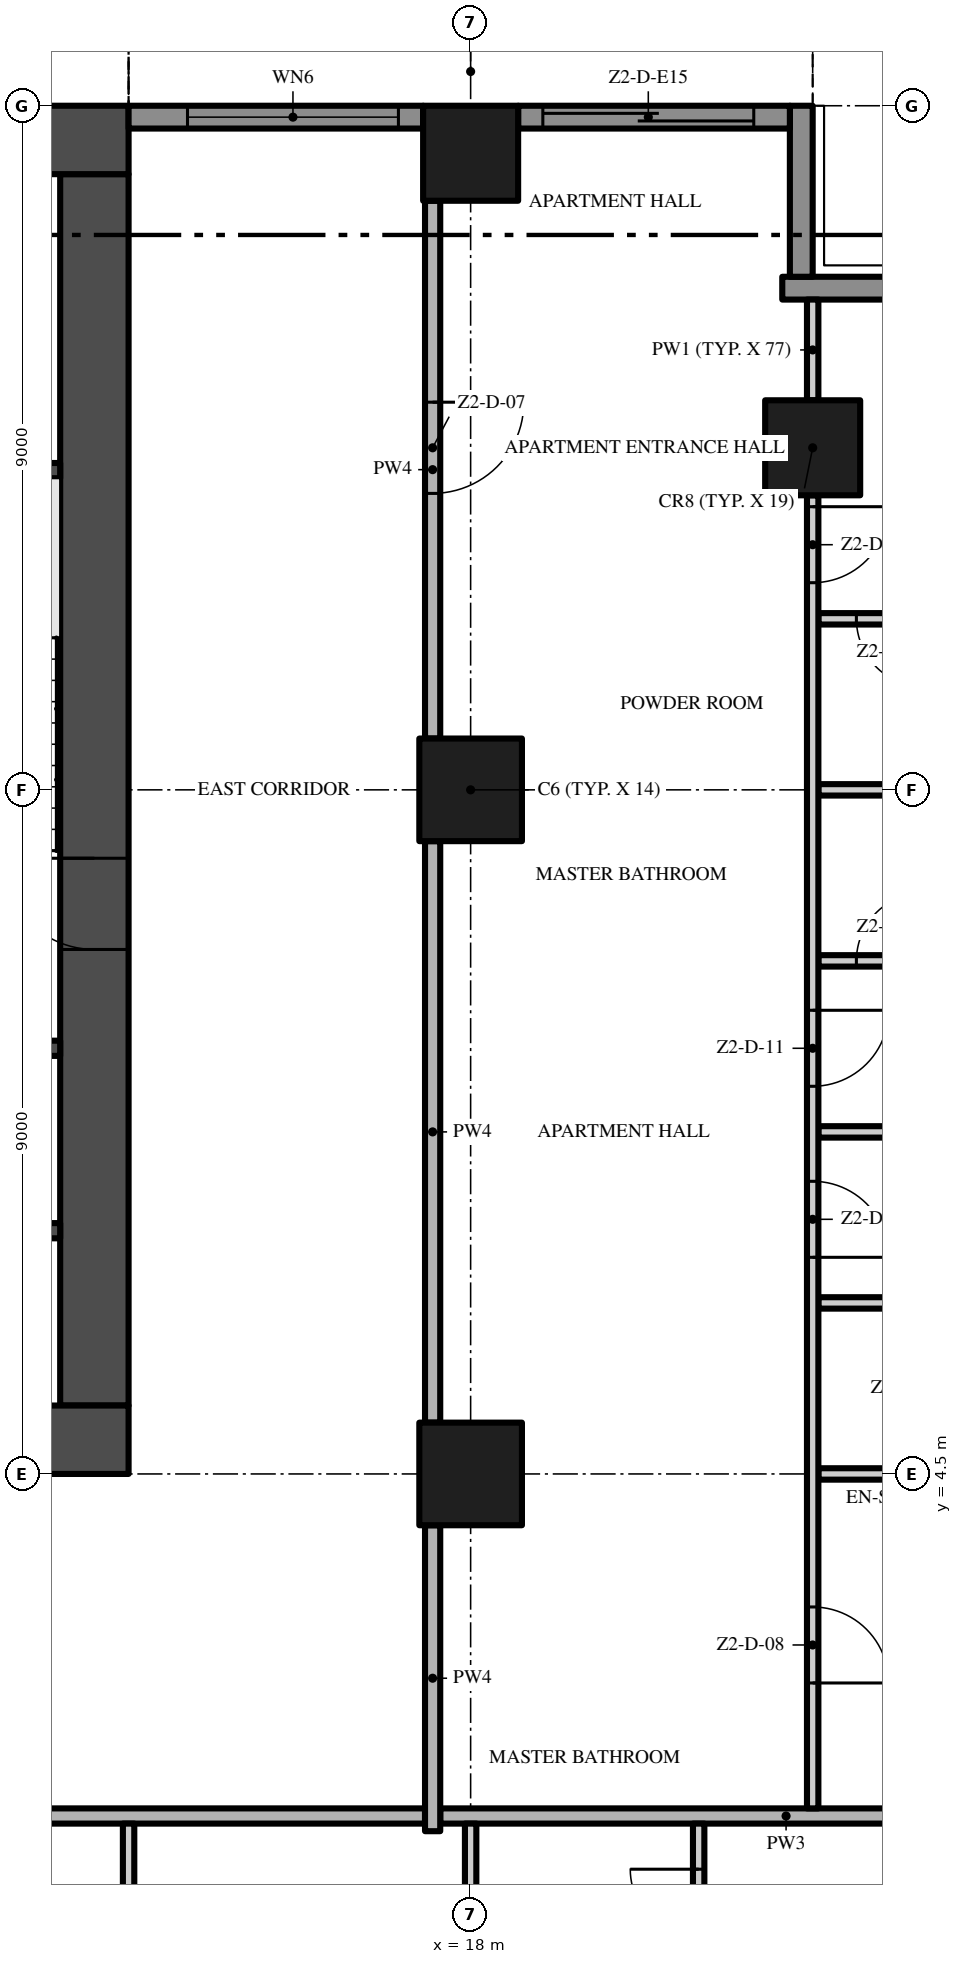
"""IFC4 building model, lengths in metres.
Left out: names, types, materials, properties, quantities, classifications, styles, units other than length and angle.
Written with IfcOpenShell. Run it as: python <this file> out.ifc"""

import sys

from ifc_helpers import new_model, si_unit, direction, frame, frame_2d, origin, origin_2d, place, context, subcontext, project, spatial, rectangle, extrude, element, fill, save


model = new_model("IFC4")
c1 = context("Model", 3, precision=1e-05, world=origin(), true_north=direction((0.0, 1.0)))
c2 = subcontext(c1, "Body", "Model", "MODEL_VIEW")
j1 = project(units=[si_unit("LENGTHUNIT", "METRE"), si_unit("PLANEANGLEUNIT", "RADIAN")], contexts=[c1])
p1 = place(None, origin())
s1 = spatial("IfcSite", under=j1, at=p1, CompositionType="ELEMENT")
p2 = place(p1, origin())
s2 = spatial("IfcBuilding", under=s1, at=p2, CompositionType="ELEMENT")
p3 = place(p2, frame((0.0, 0.0, 107.4)))
s3 = spatial("IfcBuildingStorey", under=s2, at=p3, CompositionType="ELEMENT", Elevation=107.4)
p4 = place(p3, frame((-13.5, 4.95, -0.3), z_axis=(0.0, 0.0, 1.0), x_axis=(1.0, 0.0, 0.0)))
e1 = element("IfcWall", 1, at=p4, inside=s3, PredefinedType="SHEAR", context=c2, shape_type="SweptSolid", body=[
    extrude(rectangle(XDim=27.0, YDim=0.9, at=frame_2d((13.5, 0.0))), origin(), (0.0, 0.0, 1.0), 3.8),
])
p5 = place(p4, frame((12.0, 0.0, 0.3)))
e2 = element("IfcOpeningElement", 2, at=p5, cuts=e1, PredefinedType="OPENING", context=c2, shape_type="SweptSolid", body=[
    extrude(rectangle(XDim=3.0, YDim=2.4, at=frame_2d((1.5, 1.2))), frame((0.0, 0.46, 0.0), z_axis=(0.0, -1.0, 0.0), x_axis=(1.0, 0.0, 0.0)), (0.0, 0.0, 1.0), 0.92),
])
p6 = place(p4, frame((4.9, 0.0, 0.3)))
e3 = element("IfcOpeningElement", 3, at=p6, cuts=e1, PredefinedType="OPENING", context=c2, shape_type="SweptSolid", body=[
    extrude(rectangle(XDim=1.2, YDim=2.2, at=frame_2d((0.6, 1.1))), frame((0.0, 0.46, 0.0), z_axis=(0.0, -1.0, 0.0), x_axis=(1.0, 0.0, 0.0)), (0.0, 0.0, 1.0), 0.92),
])
p7 = place(p4, frame((20.75, 0.0, 0.3)))
e4 = element("IfcOpeningElement", 4, at=p7, cuts=e1, PredefinedType="OPENING", context=c2, shape_type="SweptSolid", body=[
    extrude(rectangle(XDim=1.5, YDim=2.2, at=frame_2d((0.75, 1.1))), frame((0.0, 0.46, 0.0), z_axis=(0.0, -1.0, 0.0), x_axis=(1.0, 0.0, 0.0)), (0.0, 0.0, 1.0), 0.92),
])
p8 = place(p4, frame((17.4, 0.0, 0.3)))
e5 = element("IfcOpeningElement", 5, at=p8, cuts=e1, PredefinedType="OPENING", context=c2, shape_type="SweptSolid", body=[
    extrude(rectangle(XDim=1.2, YDim=2.2, at=frame_2d((0.6, 1.1))), frame((0.0, 0.46, 0.0), z_axis=(0.0, -1.0, 0.0), x_axis=(1.0, 0.0, 0.0)), (0.0, 0.0, 1.0), 0.92),
])
p9 = place(p3, frame((13.05, 5.4, -0.3), z_axis=(0.0, 0.0, 1.0), x_axis=(0.0, 1.0, 0.0)))
e6 = element("IfcWall", 6, at=p9, inside=s3, PredefinedType="SHEAR", context=c2, shape_type="SweptSolid", body=[
    extrude(rectangle(XDim=16.2, YDim=0.9, at=frame_2d((8.1, 0.0))), origin(), (0.0, 0.0, 1.0), 3.8),
])
p10 = place(p9, frame((6.0, 0.0, 0.3)))
e7 = element("IfcOpeningElement", 7, at=p10, cuts=e6, PredefinedType="OPENING", context=c2, shape_type="SweptSolid", body=[
    extrude(rectangle(XDim=1.2, YDim=2.2, at=frame_2d((0.6, 1.1))), frame((0.0, 0.46, 0.0), z_axis=(0.0, -1.0, 0.0), x_axis=(1.0, 0.0, 0.0)), (0.0, 0.0, 1.0), 0.92),
])
p11 = place(p3, frame((13.5, 22.05, -0.3), z_axis=(0.0, 0.0, 1.0), x_axis=(-1.0, 0.0, 0.0)))
e8 = element("IfcWall", 8, at=p11, inside=s3, PredefinedType="SHEAR", context=c2, shape_type="SweptSolid", body=[
    extrude(rectangle(XDim=27.0, YDim=0.9, at=frame_2d((13.5, 0.0))), origin(), (0.0, 0.0, 1.0), 3.8),
])
p12 = place(p3, frame((18.0, 13.5, 0.0), z_axis=(0.0, 0.0, 1.0), x_axis=(1.0, 0.0, 0.0)))
e9 = element("IfcColumn", 9, at=p12, inside=s3, PredefinedType="COLUMN", context=c2, shape_type="SweptSolid", body=[
    extrude(rectangle(XDim=1.35, YDim=1.35, at=origin_2d()), origin(), (0.0, 0.0, 1.0), 3.5),
])
p13 = place(p3, frame((18.0, 21.875, 0.0), z_axis=(0.0, 0.0, 1.0), x_axis=(1.0, 0.0, 0.0)))
e10 = element("IfcColumn", 10, at=p13, inside=s3, PredefinedType="COLUMN", context=c2, shape_type="SweptSolid", body=[
    extrude(rectangle(XDim=1.25, YDim=1.25, at=origin_2d()), origin(), (0.0, 0.0, 1.0), 3.5),
])
p14 = place(p3, frame((18.0, 4.5, 0.0), z_axis=(0.0, 0.0, 1.0), x_axis=(1.0, 0.0, 0.0)))
e11 = element("IfcColumn", 11, at=p14, inside=s3, PredefinedType="COLUMN", context=c2, shape_type="SweptSolid", body=[
    extrude(rectangle(XDim=1.35, YDim=1.35, at=origin_2d()), origin(), (0.0, 0.0, 1.0), 3.5),
])
p15 = place(p3, frame((22.5, 18.0, 0.0), z_axis=(0.0, 0.0, 1.0), x_axis=(1.0, 0.0, 0.0)))
e12 = element("IfcColumn", 12, at=p15, inside=s3, PredefinedType="COLUMN", context=c2, shape_type="SweptSolid", body=[
    extrude(rectangle(XDim=1.25, YDim=1.25, at=origin_2d()), origin(), (0.0, 0.0, 1.0), 3.5),
])
p16 = place(p3, frame((22.1, 20.1, 0.0), z_axis=(0.0, 0.0, 1.0), x_axis=(1.0, 0.0, 0.0)))
e13 = element("IfcWall", 13, at=p16, inside=s3, PredefinedType="SOLIDWALL", context=c2, shape_type="SweptSolid", body=[
    extrude(rectangle(XDim=2.35, YDim=0.3, at=frame_2d((1.175, 0.0))), origin(), (0.0, 0.0, 1.0), 3.5),
])
p17 = place(p3, frame((22.35, 22.5, 0.0), z_axis=(0.0, 0.0, 1.0), x_axis=(0.0, -1.0, 0.0)))
e14 = element("IfcWall", 14, at=p17, inside=s3, PredefinedType="SOLIDWALL", context=c2, shape_type="SweptSolid", body=[
    extrude(rectangle(XDim=2.25, YDim=0.3, at=frame_2d((1.125, 0.0))), origin(), (0.0, 0.0, 1.0), 3.5),
])
p18 = place(p3, frame((18.625, 22.35, 0.0), z_axis=(0.0, 0.0, 1.0), x_axis=(1.0, 0.0, 0.0)))
e15 = element("IfcWall", 15, at=p18, inside=s3, PredefinedType="SOLIDWALL", context=c2, shape_type="SweptSolid", body=[
    extrude(rectangle(XDim=3.575, YDim=0.3, at=frame_2d((1.788, 0.0))), origin(), (0.0, 0.0, 1.0), 3.5),
])
p19 = place(p18, frame((0.325, 0.0, 0.0)))
e16 = element("IfcOpeningElement", 16, at=p19, cuts=e15, PredefinedType="OPENING", context=c2, shape_type="SweptSolid", body=[
    extrude(rectangle(XDim=2.775, YDim=2.4, at=frame_2d((1.387, 1.2))), frame((0.0, 0.16, 0.0), z_axis=(0.0, -1.0, 0.0), x_axis=(1.0, 0.0, 0.0)), (0.0, 0.0, 1.0), 0.32),
])
p20 = place(p3, frame((13.5, 22.35, 0.0), z_axis=(0.0, 0.0, 1.0), x_axis=(1.0, 0.0, 0.0)))
e17 = element("IfcWall", 17, at=p20, inside=s3, PredefinedType="SOLIDWALL", context=c2, shape_type="SweptSolid", body=[
    extrude(rectangle(XDim=3.875, YDim=0.3, at=frame_2d((1.938, 0.0))), origin(), (0.0, 0.0, 1.0), 3.5),
])
p21 = place(p20, frame((0.775, 0.0, 0.45)))
e18 = element("IfcOpeningElement", 18, at=p21, cuts=e17, PredefinedType="OPENING", context=c2, shape_type="SweptSolid", body=[
    extrude(rectangle(XDim=2.775, YDim=2.65, at=frame_2d((1.387, 1.325))), frame((0.0, 0.16, 0.0), z_axis=(0.0, -1.0, 0.0), x_axis=(1.0, 0.0, 0.0)), (0.0, 0.0, 1.0), 0.32),
])
for number, where, z_axis, x_axis in (
    (19, (9.65, 7.7, 0.0), (0.0, 0.0, 1.0), (1.0, 0.0, 0.0)),
    (20, (9.65, 10.1, 0.0), (0.0, 0.0, 1.0), (1.0, 0.0, 0.0)),
    (21, (9.65, 17.7, 0.0), (0.0, 0.0, 1.0), (1.0, 0.0, 0.0)),
):
    element("IfcWall", number, at=place(p3, frame(where, z_axis=z_axis, x_axis=x_axis)), inside=s3, PredefinedType="SHEAR", context=c2, shape_type="SweptSolid", body=[
        extrude(rectangle(XDim=2.95, YDim=0.2, at=frame_2d((1.475, 0.0))), origin(), (0.0, 0.0, 1.0), 3.5),
    ])
p22 = place(p3, frame((4.6, 0.0, 0.0), z_axis=(0.0, 0.0, 1.0), x_axis=(1.0, 0.0, 0.0)))
e22 = element("IfcWall", 22, at=p22, inside=s3, PredefinedType="PARTITIONING", context=c2, shape_type="SweptSolid", body=[
    extrude(rectangle(XDim=12.8, YDim=0.2, at=frame_2d((6.4, 0.0))), origin(), (0.0, 0.0, 1.0), 3.5),
])
p23 = place(p3, frame((17.6, 0.0, 0.0), z_axis=(0.0, 0.0, 1.0), x_axis=(1.0, 0.0, 0.0)))
e23 = element("IfcWall", 23, at=p23, inside=s3, PredefinedType="PARTITIONING", context=c2, shape_type="SweptSolid", body=[
    extrude(rectangle(XDim=9.1, YDim=0.2, at=frame_2d((4.55, 0.0))), origin(), (0.0, 0.0, 1.0), 3.5),
])
p24 = place(p3, frame((22.575, 4.5, 0.0), z_axis=(0.0, 0.0, 1.0), x_axis=(1.0, 0.0, 0.0)))
e24 = element("IfcWall", 24, at=p24, inside=s3, PredefinedType="PARTITIONING", context=c2, shape_type="SweptSolid", body=[
    extrude(rectangle(XDim=3.175, YDim=0.15, at=frame_2d((1.587, 0.0))), origin(), (0.0, 0.0, 1.0), 3.5),
])
p25 = place(p3, frame((22.575, 6.75, 0.0), z_axis=(0.0, 0.0, 1.0), x_axis=(1.0, 0.0, 0.0)))
e25 = element("IfcWall", 25, at=p25, inside=s3, PredefinedType="PARTITIONING", context=c2, shape_type="SweptSolid", body=[
    extrude(rectangle(XDim=1.875, YDim=0.15, at=frame_2d((0.938, 0.0))), origin(), (0.0, 0.0, 1.0), 3.5),
])
p26 = place(p3, frame((22.575, 9.0, 0.0), z_axis=(0.0, 0.0, 1.0), x_axis=(1.0, 0.0, 0.0)))
e26 = element("IfcWall", 26, at=p26, inside=s3, PredefinedType="PARTITIONING", context=c2, shape_type="SweptSolid", body=[
    extrude(rectangle(XDim=4.125, YDim=0.15, at=frame_2d((2.062, 0.0))), origin(), (0.0, 0.0, 1.0), 3.5),
])
p27 = place(p3, frame((22.575, 11.25, 0.0), z_axis=(0.0, 0.0, 1.0), x_axis=(1.0, 0.0, 0.0)))
e27 = element("IfcWall", 27, at=p27, inside=s3, PredefinedType="PARTITIONING", context=c2, shape_type="SweptSolid", body=[
    extrude(rectangle(XDim=1.875, YDim=0.15, at=frame_2d((0.938, 0.0))), origin(), (0.0, 0.0, 1.0), 3.5),
])
p28 = place(p27, frame((0.5, 0.0, 0.0)))
e28 = element("IfcOpeningElement", 28, at=p28, cuts=e27, PredefinedType="OPENING", context=c2, shape_type="SweptSolid", body=[
    extrude(rectangle(XDim=0.9, YDim=2.1, at=frame_2d((0.45, 1.05))), frame((0.0, 0.085, 0.0), z_axis=(0.0, -1.0, 0.0), x_axis=(1.0, 0.0, 0.0)), (0.0, 0.0, 1.0), 0.17),
])
p29 = place(p3, frame((22.575, 13.5, 0.0), z_axis=(0.0, 0.0, 1.0), x_axis=(1.0, 0.0, 0.0)))
e29 = element("IfcWall", 29, at=p29, inside=s3, PredefinedType="PARTITIONING", context=c2, shape_type="SweptSolid", body=[
    extrude(rectangle(XDim=1.875, YDim=0.15, at=frame_2d((0.938, 0.0))), origin(), (0.0, 0.0, 1.0), 3.5),
])
p30 = place(p3, frame((24.45, 15.75, 0.0), z_axis=(0.0, 0.0, 1.0), x_axis=(-1.0, 0.0, 0.0)))
e30 = element("IfcWall", 30, at=p30, inside=s3, PredefinedType="PARTITIONING", context=c2, shape_type="SweptSolid", body=[
    extrude(rectangle(XDim=1.875, YDim=0.15, at=frame_2d((0.938, 0.0))), origin(), (0.0, 0.0, 1.0), 3.5),
])
p31 = place(p30, frame((0.475, 0.0, 0.0)))
e31 = element("IfcOpeningElement", 31, at=p31, cuts=e30, PredefinedType="OPENING", context=c2, shape_type="SweptSolid", body=[
    extrude(rectangle(XDim=0.9, YDim=2.1, at=frame_2d((0.45, 1.05))), frame((0.0, 0.085, 0.0), z_axis=(0.0, -1.0, 0.0), x_axis=(1.0, 0.0, 0.0)), (0.0, 0.0, 1.0), 0.17),
])
p32 = place(p3, frame((13.5, -10.275, 0.0), z_axis=(0.0, 0.0, 1.0), x_axis=(0.0, 1.0, 0.0)))
e32 = element("IfcWall", 32, at=p32, inside=s3, PredefinedType="PARTITIONING", context=c2, shape_type="SweptSolid", body=[
    extrude(rectangle(XDim=10.175, YDim=0.15, at=frame_2d((5.088, 0.0))), origin(), (0.0, 0.0, 1.0), 3.5),
])
p33 = place(p3, frame((17.5, -0.2, 0.0), z_axis=(0.0, 0.0, 1.0), x_axis=(0.0, 1.0, 0.0)))
e33 = element("IfcWall", 33, at=p33, inside=s3, PredefinedType="PARTITIONING", context=c2, shape_type="SweptSolid", body=[
    extrude(rectangle(XDim=4.025, YDim=0.2, at=frame_2d((2.013, 0.0))), origin(), (0.0, 0.0, 1.0), 3.5),
])
p34 = place(p3, frame((17.5, 5.175, 0.0), z_axis=(0.0, 0.0, 1.0), x_axis=(0.0, 1.0, 0.0)))
e34 = element("IfcWall", 34, at=p34, inside=s3, PredefinedType="PARTITIONING", context=c2, shape_type="SweptSolid", body=[
    extrude(rectangle(XDim=7.65, YDim=0.2, at=frame_2d((3.825, 0.0))), origin(), (0.0, 0.0, 1.0), 3.5),
])
p35 = place(p3, frame((17.5, 21.25, 0.0), z_axis=(0.0, 0.0, 1.0), x_axis=(0.0, -1.0, 0.0)))
e35 = element("IfcWall", 35, at=p35, inside=s3, PredefinedType="PARTITIONING", context=c2, shape_type="SweptSolid", body=[
    extrude(rectangle(XDim=7.075, YDim=0.2, at=frame_2d((3.538, 0.0))), origin(), (0.0, 0.0, 1.0), 3.5),
])
p36 = place(p35, frame((2.65, 0.0, 0.0)))
e36 = element("IfcOpeningElement", 36, at=p36, cuts=e35, PredefinedType="OPENING", context=c2, shape_type="SweptSolid", body=[
    extrude(rectangle(XDim=1.2, YDim=2.4, at=frame_2d((0.6, 1.2))), frame((0.0, 0.11, 0.0), z_axis=(0.0, -1.0, 0.0), x_axis=(1.0, 0.0, 0.0)), (0.0, 0.0, 1.0), 0.22),
])
p37 = place(p3, frame((18.0, -0.1, 0.0), z_axis=(0.0, 0.0, 1.0), x_axis=(0.0, -1.0, 0.0)))
e37 = element("IfcWall", 37, at=p37, inside=s3, PredefinedType="PARTITIONING", context=c2, shape_type="SweptSolid", body=[
    extrude(rectangle(XDim=3.725, YDim=0.15, at=frame_2d((1.863, 0.0))), origin(), (0.0, 0.0, 1.0), 3.5),
])
p38 = place(p37, frame((2.575, 0.0, 0.0)))
e38 = element("IfcOpeningElement", 38, at=p38, cuts=e37, PredefinedType="OPENING", context=c2, shape_type="SweptSolid", body=[
    extrude(rectangle(XDim=1.0, YDim=2.4, at=frame_2d((0.5, 1.2))), frame((0.0, 0.085, 0.0), z_axis=(0.0, -1.0, 0.0), x_axis=(1.0, 0.0, 0.0)), (0.0, 0.0, 1.0), 0.17),
])
p39 = place(p3, frame((21.0, -2.325, 0.0), z_axis=(0.0, 0.0, 1.0), x_axis=(0.0, 1.0, 0.0)))
e39 = element("IfcWall", 39, at=p39, inside=s3, PredefinedType="PARTITIONING", context=c2, shape_type="SweptSolid", body=[
    extrude(rectangle(XDim=2.225, YDim=0.15, at=frame_2d((1.113, 0.0))), origin(), (0.0, 0.0, 1.0), 3.5),
])
p40 = place(p39, frame((0.725, 0.0, 0.0)))
e40 = element("IfcOpeningElement", 40, at=p40, cuts=e39, PredefinedType="OPENING", context=c2, shape_type="SweptSolid", body=[
    extrude(rectangle(XDim=0.9, YDim=2.1, at=frame_2d((0.45, 1.05))), frame((0.0, 0.085, 0.0), z_axis=(0.0, -1.0, 0.0), x_axis=(1.0, 0.0, 0.0)), (0.0, 0.0, 1.0), 0.17),
])
p41 = place(p3, frame((22.5, 17.375, 0.0), z_axis=(0.0, 0.0, 1.0), x_axis=(0.0, -1.0, 0.0)))
e41 = element("IfcWall", 41, at=p41, inside=s3, PredefinedType="PARTITIONING", context=c2, shape_type="SweptSolid", body=[
    extrude(rectangle(XDim=17.275, YDim=0.15, at=frame_2d((8.637, 0.0))), origin(), (0.0, 0.0, 1.0), 3.5),
])
p42 = place(p41, frame((14.625, 0.0, 0.0)))
e42 = element("IfcOpeningElement", 42, at=p42, cuts=e41, PredefinedType="OPENING", context=c2, shape_type="SweptSolid", body=[
    extrude(rectangle(XDim=1.0, YDim=2.4, at=frame_2d((0.5, 1.2))), frame((0.0, 0.085, 0.0), z_axis=(0.0, -1.0, 0.0), x_axis=(1.0, 0.0, 0.0)), (0.0, 0.0, 1.0), 0.17),
])
p43 = place(p41, frame((9.025, 0.0, 0.0)))
e43 = element("IfcOpeningElement", 43, at=p43, cuts=e41, PredefinedType="OPENING", context=c2, shape_type="SweptSolid", body=[
    extrude(rectangle(XDim=1.0, YDim=2.4, at=frame_2d((0.5, 1.2))), frame((0.0, 0.085, 0.0), z_axis=(0.0, -1.0, 0.0), x_axis=(1.0, 0.0, 0.0)), (0.0, 0.0, 1.0), 0.17),
])
p44 = place(p41, frame((6.775, 0.0, 0.0)))
e44 = element("IfcOpeningElement", 44, at=p44, cuts=e41, PredefinedType="OPENING", context=c2, shape_type="SweptSolid", body=[
    extrude(rectangle(XDim=1.0, YDim=2.4, at=frame_2d((0.5, 1.2))), frame((0.0, 0.085, 0.0), z_axis=(0.0, -1.0, 0.0), x_axis=(1.0, 0.0, 0.0)), (0.0, 0.0, 1.0), 0.17),
])
p45 = place(p41, frame((0.15, 0.0, 0.0)))
e45 = element("IfcOpeningElement", 45, at=p45, cuts=e41, PredefinedType="OPENING", context=c2, shape_type="SweptSolid", body=[
    extrude(rectangle(XDim=1.0, YDim=2.4, at=frame_2d((0.5, 1.2))), frame((0.0, 0.085, 0.0), z_axis=(0.0, -1.0, 0.0), x_axis=(1.0, 0.0, 0.0)), (0.0, 0.0, 1.0), 0.17),
])
p46 = place(p3, frame((22.5, 18.625, 0.0), z_axis=(0.0, 0.0, 1.0), x_axis=(0.0, 1.0, 0.0)))
e46 = element("IfcWall", 46, at=p46, inside=s3, PredefinedType="PARTITIONING", context=c2, shape_type="SweptSolid", body=[
    extrude(rectangle(XDim=1.325, YDim=0.15, at=frame_2d((0.662, 0.0))), origin(), (0.0, 0.0, 1.0), 3.5),
])
p47 = place(p19, origin())
e47 = element("IfcDoor", 47, at=p47, inside=s3, OperationType="SINGLE_SWING_LEFT", PredefinedType="DOOR", context=c2, shape_type="SweptSolid", body=[
    extrude(rectangle(XDim=2.775, YDim=2.4, at=frame_2d((1.387, 1.2))), frame((0.0, 0.025, 0.0), z_axis=(0.0, -1.0, 0.0), x_axis=(1.0, 0.0, 0.0)), (0.0, 0.0, 1.0), 0.05),
])
fill(e16, e47)
p48 = place(p21, origin())
e48 = element("IfcWindow", 48, at=p48, inside=s3, PartitioningType="SINGLE_PANEL", PredefinedType="WINDOW", context=c2, shape_type="SweptSolid", body=[
    extrude(rectangle(XDim=2.775, YDim=2.65, at=frame_2d((1.387, 1.325))), frame((0.0, 0.03, 0.0), z_axis=(0.0, -1.0, 0.0), x_axis=(1.0, 0.0, 0.0)), (0.0, 0.0, 1.0), 0.06),
])
fill(e18, e48)
p49 = place(p10, frame((1.2, 0.0, 0.0), z_axis=(0.0, 0.0, 1.0), x_axis=(-1.0, 0.0, 0.0)))
e49 = element("IfcDoor", 49, at=p49, inside=s3, OperationType="SINGLE_SWING_LEFT", PredefinedType="DOOR", context=c2, shape_type="SweptSolid", body=[
    extrude(rectangle(XDim=1.2, YDim=2.2, at=frame_2d((0.6, 1.1))), frame((0.0, 0.025, 0.0), z_axis=(0.0, -1.0, 0.0), x_axis=(1.0, 0.0, 0.0)), (0.0, 0.0, 1.0), 0.05),
])
fill(e7, e49)
p50 = place(p36, origin())
e50 = element("IfcDoor", 50, at=p50, inside=s3, OperationType="SINGLE_SWING_LEFT", PredefinedType="DOOR", context=c2, shape_type="SweptSolid", body=[
    extrude(rectangle(XDim=1.2, YDim=2.4, at=frame_2d((0.6, 1.2))), frame((0.0, 0.025, 0.0), z_axis=(0.0, -1.0, 0.0), x_axis=(1.0, 0.0, 0.0)), (0.0, 0.0, 1.0), 0.05),
])
fill(e36, e50)
p51 = place(p42, origin())
e51 = element("IfcDoor", 51, at=p51, inside=s3, OperationType="SINGLE_SWING_RIGHT", PredefinedType="DOOR", context=c2, shape_type="SweptSolid", body=[
    extrude(rectangle(XDim=1.0, YDim=2.4, at=frame_2d((0.5, 1.2))), frame((0.0, 0.025, 0.0), z_axis=(0.0, -1.0, 0.0), x_axis=(1.0, 0.0, 0.0)), (0.0, 0.0, 1.0), 0.05),
])
fill(e42, e51)
p52 = place(p43, origin())
e52 = element("IfcDoor", 52, at=p52, inside=s3, OperationType="SINGLE_SWING_RIGHT", PredefinedType="DOOR", context=c2, shape_type="SweptSolid", body=[
    extrude(rectangle(XDim=1.0, YDim=2.4, at=frame_2d((0.5, 1.2))), frame((0.0, 0.025, 0.0), z_axis=(0.0, -1.0, 0.0), x_axis=(1.0, 0.0, 0.0)), (0.0, 0.0, 1.0), 0.05),
])
fill(e43, e52)
p53 = place(p44, origin())
e53 = element("IfcDoor", 53, at=p53, inside=s3, OperationType="SINGLE_SWING_LEFT", PredefinedType="DOOR", context=c2, shape_type="SweptSolid", body=[
    extrude(rectangle(XDim=1.0, YDim=2.4, at=frame_2d((0.5, 1.2))), frame((0.0, 0.025, 0.0), z_axis=(0.0, -1.0, 0.0), x_axis=(1.0, 0.0, 0.0)), (0.0, 0.0, 1.0), 0.05),
])
fill(e44, e53)
p54 = place(p28, origin())
e54 = element("IfcDoor", 54, at=p54, inside=s3, OperationType="SINGLE_SWING_RIGHT", PredefinedType="DOOR", context=c2, shape_type="SweptSolid", body=[
    extrude(rectangle(XDim=0.9, YDim=2.1, at=frame_2d((0.45, 1.05))), frame((0.0, 0.025, 0.0), z_axis=(0.0, -1.0, 0.0), x_axis=(1.0, 0.0, 0.0)), (0.0, 0.0, 1.0), 0.05),
])
fill(e28, e54)
p55 = place(p45, origin())
e55 = element("IfcDoor", 55, at=p55, inside=s3, OperationType="SINGLE_SWING_LEFT", PredefinedType="DOOR", context=c2, shape_type="SweptSolid", body=[
    extrude(rectangle(XDim=1.0, YDim=2.4, at=frame_2d((0.5, 1.2))), frame((0.0, 0.025, 0.0), z_axis=(0.0, -1.0, 0.0), x_axis=(1.0, 0.0, 0.0)), (0.0, 0.0, 1.0), 0.05),
])
fill(e45, e55)
p56 = place(p31, origin())
e56 = element("IfcDoor", 56, at=p56, inside=s3, OperationType="SINGLE_SWING_LEFT", PredefinedType="DOOR", context=c2, shape_type="SweptSolid", body=[
    extrude(rectangle(XDim=0.9, YDim=2.1, at=frame_2d((0.45, 1.05))), frame((0.0, 0.025, 0.0), z_axis=(0.0, -1.0, 0.0), x_axis=(1.0, 0.0, 0.0)), (0.0, 0.0, 1.0), 0.05),
])
fill(e31, e56)
p57 = place(p40, origin())
e57 = element("IfcDoor", 57, at=p57, inside=s3, OperationType="SINGLE_SWING_RIGHT", PredefinedType="DOOR", context=c2, shape_type="SweptSolid", body=[
    extrude(rectangle(XDim=0.9, YDim=2.1, at=frame_2d((0.45, 1.05))), frame((0.0, 0.025, 0.0), z_axis=(0.0, -1.0, 0.0), x_axis=(1.0, 0.0, 0.0)), (0.0, 0.0, 1.0), 0.05),
])
fill(e40, e57)
save(model, sys.argv[1])
